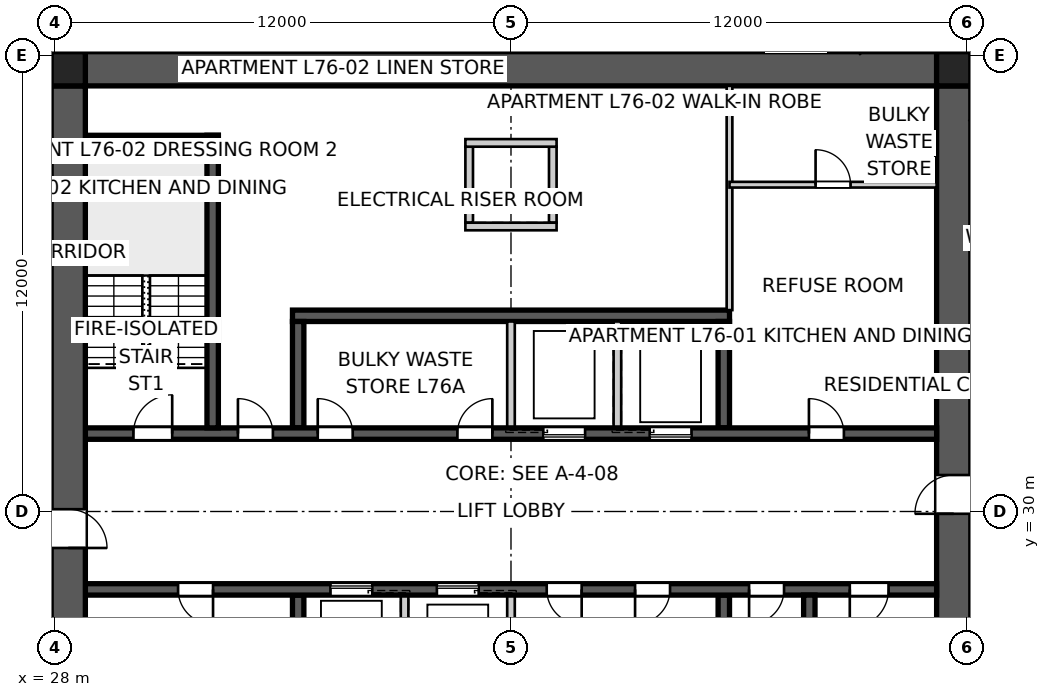
"""IFC4 building model, lengths in metres.
Left out: names, types, materials, properties, quantities, classifications, styles, units other than length and angle.
Written with IfcOpenShell. Run it as: python <this file> out.ifc"""

import sys

from ifc_helpers import new_model, si_unit, direction, frame, frame_2d, origin, origin_2d, place, context, subcontext, project, spatial, polyline, rectangle, outline, extrude, element, fill, save


model = new_model("IFC4")
c1 = context("Model", 3, precision=1e-05, world=origin(), true_north=direction((0.0, 1.0)))
c2 = subcontext(c1, "Body", "Model", "MODEL_VIEW")
j1 = project(units=[si_unit("LENGTHUNIT", "METRE"), si_unit("PLANEANGLEUNIT", "RADIAN")], contexts=[c1])
p1 = place(None, origin())
s1 = spatial("IfcSite", under=j1, at=p1, CompositionType="ELEMENT")
p2 = place(p1, origin())
s2 = spatial("IfcBuilding", under=s1, at=p2, CompositionType="ELEMENT")
p3 = place(p2, frame((0.0, 0.0, 276.0)))
s3 = spatial("IfcBuildingStorey", under=s2, at=p3, CompositionType="ELEMENT", Elevation=276.0)
p4 = place(p3, frame((28.8, 41.65, 0.0), z_axis=(0.0, 0.0, 1.0), x_axis=(1.0, 0.0, 0.0)))
e1 = element("IfcWall", 1, at=p4, inside=s3, PredefinedType="SHEAR", context=c2, shape_type="SweptSolid", body=[
    extrude(outline(polyline([(0.0, -0.45), (22.4, -0.45), (22.4, -0.025), (22.85, -0.025), (22.85, 0.025), (22.4, 0.025), (22.4, 0.45), (0.0, 0.45), (0.0, 0.025), (-0.45, 0.025), (-0.45, -0.025), (0.0, -0.025), (0.0, -0.45)])), origin(), (0.0, 0.0, 1.0), 3.4),
])
p5 = place(p3, frame((51.65, 18.8, 0.0), z_axis=(0.0, 0.0, 1.0), x_axis=(0.0, 1.0, 0.0)))
e2 = element("IfcWall", 2, at=p5, inside=s3, PredefinedType="SHEAR", context=c2, shape_type="SweptSolid", body=[
    extrude(outline(polyline([(0.0, -0.45), (22.4, -0.45), (22.4, -0.025), (22.85, -0.025), (22.85, 0.025), (22.4, 0.025), (22.4, 0.45), (0.0, 0.45), (0.0, 0.025), (-0.45, 0.025), (-0.45, -0.025), (0.0, -0.025), (0.0, -0.45)])), origin(), (0.0, 0.0, 1.0), 3.4),
])
p6 = place(p5, frame((11.14, 0.0, 0.0)))
e3 = element("IfcOpeningElement", 3, at=p6, cuts=e2, PredefinedType="OPENING", context=c2, shape_type="SweptSolid", body=[
    extrude(rectangle(XDim=1.02, YDim=2.4, at=frame_2d((0.51, 1.2))), frame((0.0, 0.46, 0.0), z_axis=(0.0, -1.0, 0.0), x_axis=(1.0, 0.0, 0.0)), (0.0, 0.0, 1.0), 0.92),
])
p7 = place(p3, frame((28.35, 41.2, 0.0), z_axis=(0.0, 0.0, 1.0), x_axis=(0.0, -1.0, 0.0)))
e4 = element("IfcWall", 4, at=p7, inside=s3, PredefinedType="SHEAR", context=c2, shape_type="SweptSolid", body=[
    extrude(outline(polyline([(0.0, -0.45), (22.4, -0.45), (22.4, -0.025), (22.85, -0.025), (22.85, 0.025), (22.4, 0.025), (22.4, 0.45), (0.0, 0.45), (0.0, 0.025), (-0.45, 0.025), (-0.45, -0.025), (0.0, -0.025), (0.0, -0.45)])), origin(), (0.0, 0.0, 1.0), 3.4),
])
p8 = place(p7, frame((11.14, 0.0, 0.0)))
e5 = element("IfcOpeningElement", 5, at=p8, cuts=e4, PredefinedType="OPENING", context=c2, shape_type="SweptSolid", body=[
    extrude(rectangle(XDim=1.02, YDim=2.4, at=frame_2d((0.51, 1.2))), frame((0.0, 0.46, 0.0), z_axis=(0.0, -1.0, 0.0), x_axis=(1.0, 0.0, 0.0)), (0.0, 0.0, 1.0), 0.92),
])
p9 = place(p3, frame((28.8, 32.05, 0.0), z_axis=(0.0, 0.0, 1.0), x_axis=(1.0, 0.0, 0.0)))
e6 = element("IfcWall", 6, at=p9, inside=s3, PredefinedType="SHEAR", context=c2, shape_type="SweptSolid", body=[
    extrude(rectangle(XDim=22.4, YDim=0.3, at=frame_2d((11.2, 0.0))), origin(), (0.0, 0.0, 1.0), 3.4),
])
p10 = place(p9, frame((19.04, 0.0, 0.0)))
e7 = element("IfcOpeningElement", 7, at=p10, cuts=e6, PredefinedType="OPENING", context=c2, shape_type="SweptSolid", body=[
    extrude(rectangle(XDim=0.92, YDim=2.1, at=frame_2d((0.46, 1.05))), frame((0.0, 0.16, 0.0), z_axis=(0.0, -1.0, 0.0), x_axis=(1.0, 0.0, 0.0)), (0.0, 0.0, 1.0), 0.32),
])
p11 = place(p9, frame((1.265, 0.0, 0.0)))
e8 = element("IfcOpeningElement", 8, at=p11, cuts=e6, PredefinedType="OPENING", context=c2, shape_type="SweptSolid", body=[
    extrude(rectangle(XDim=1.02, YDim=2.1, at=frame_2d((0.51, 1.05))), frame((0.0, 0.16, 0.0), z_axis=(0.0, -1.0, 0.0), x_axis=(1.0, 0.0, 0.0)), (0.0, 0.0, 1.0), 0.32),
])
p12 = place(p9, frame((4.015, 0.0, 0.0)))
e9 = element("IfcOpeningElement", 9, at=p12, cuts=e6, PredefinedType="OPENING", context=c2, shape_type="SweptSolid", body=[
    extrude(rectangle(XDim=0.92, YDim=2.1, at=frame_2d((0.46, 1.05))), frame((0.0, 0.16, 0.0), z_axis=(0.0, -1.0, 0.0), x_axis=(1.0, 0.0, 0.0)), (0.0, 0.0, 1.0), 0.32),
])
p13 = place(p9, frame((6.115, 0.0, 0.0)))
e10 = element("IfcOpeningElement", 10, at=p13, cuts=e6, PredefinedType="OPENING", context=c2, shape_type="SweptSolid", body=[
    extrude(rectangle(XDim=0.92, YDim=2.1, at=frame_2d((0.46, 1.05))), frame((0.0, 0.16, 0.0), z_axis=(0.0, -1.0, 0.0), x_axis=(1.0, 0.0, 0.0)), (0.0, 0.0, 1.0), 0.32),
])
p14 = place(p9, frame((9.79, 0.0, 0.0)))
e11 = element("IfcOpeningElement", 11, at=p14, cuts=e6, PredefinedType="OPENING", context=c2, shape_type="SweptSolid", body=[
    extrude(rectangle(XDim=0.92, YDim=2.1, at=frame_2d((0.46, 1.05))), frame((0.0, 0.16, 0.0), z_axis=(0.0, -1.0, 0.0), x_axis=(1.0, 0.0, 0.0)), (0.0, 0.0, 1.0), 0.32),
])
p15 = place(p9, frame((12.05, 0.0, 0.0)))
e12 = element("IfcOpeningElement", 12, at=p15, cuts=e6, PredefinedType="OPENING", context=c2, shape_type="SweptSolid", body=[
    extrude(rectangle(XDim=1.1, YDim=2.1, at=frame_2d((0.55, 1.05))), frame((0.0, 0.16, 0.0), z_axis=(0.0, -1.0, 0.0), x_axis=(1.0, 0.0, 0.0)), (0.0, 0.0, 1.0), 0.32),
])
p16 = place(p9, frame((14.85, 0.0, 0.0)))
e13 = element("IfcOpeningElement", 13, at=p16, cuts=e6, PredefinedType="OPENING", context=c2, shape_type="SweptSolid", body=[
    extrude(rectangle(XDim=1.1, YDim=2.1, at=frame_2d((0.55, 1.05))), frame((0.0, 0.16, 0.0), z_axis=(0.0, -1.0, 0.0), x_axis=(1.0, 0.0, 0.0)), (0.0, 0.0, 1.0), 0.32),
])
p17 = place(p3, frame((51.2, 27.95, 0.0), z_axis=(0.0, 0.0, 1.0), x_axis=(-1.0, 0.0, 0.0)))
e14 = element("IfcWall", 14, at=p17, inside=s3, PredefinedType="SHEAR", context=c2, shape_type="SweptSolid", body=[
    extrude(rectangle(XDim=22.4, YDim=0.3, at=frame_2d((11.2, 0.0))), origin(), (0.0, 0.0, 1.0), 3.4),
])
p18 = place(p17, frame((19.04, 0.0, 0.0)))
e15 = element("IfcOpeningElement", 15, at=p18, cuts=e14, PredefinedType="OPENING", context=c2, shape_type="SweptSolid", body=[
    extrude(rectangle(XDim=0.92, YDim=2.1, at=frame_2d((0.46, 1.05))), frame((0.0, 0.16, 0.0), z_axis=(0.0, -1.0, 0.0), x_axis=(1.0, 0.0, 0.0)), (0.0, 0.0, 1.0), 0.32),
])
p19 = place(p17, frame((1.265, 0.0, 0.0)))
e16 = element("IfcOpeningElement", 16, at=p19, cuts=e14, PredefinedType="OPENING", context=c2, shape_type="SweptSolid", body=[
    extrude(rectangle(XDim=1.02, YDim=2.1, at=frame_2d((0.51, 1.05))), frame((0.0, 0.16, 0.0), z_axis=(0.0, -1.0, 0.0), x_axis=(1.0, 0.0, 0.0)), (0.0, 0.0, 1.0), 0.32),
])
p20 = place(p17, frame((4.015, 0.0, 0.0)))
e17 = element("IfcOpeningElement", 17, at=p20, cuts=e14, PredefinedType="OPENING", context=c2, shape_type="SweptSolid", body=[
    extrude(rectangle(XDim=0.92, YDim=2.1, at=frame_2d((0.46, 1.05))), frame((0.0, 0.16, 0.0), z_axis=(0.0, -1.0, 0.0), x_axis=(1.0, 0.0, 0.0)), (0.0, 0.0, 1.0), 0.32),
])
p21 = place(p17, frame((9.34, 0.0, 0.0)))
e18 = element("IfcOpeningElement", 18, at=p21, cuts=e14, PredefinedType="OPENING", context=c2, shape_type="SweptSolid", body=[
    extrude(rectangle(XDim=0.92, YDim=2.1, at=frame_2d((0.46, 1.05))), frame((0.0, 0.16, 0.0), z_axis=(0.0, -1.0, 0.0), x_axis=(1.0, 0.0, 0.0)), (0.0, 0.0, 1.0), 0.32),
])
p22 = place(p17, frame((7.015, 0.0, 0.0)))
e19 = element("IfcOpeningElement", 19, at=p22, cuts=e14, PredefinedType="OPENING", context=c2, shape_type="SweptSolid", body=[
    extrude(rectangle(XDim=0.92, YDim=2.1, at=frame_2d((0.46, 1.05))), frame((0.0, 0.16, 0.0), z_axis=(0.0, -1.0, 0.0), x_axis=(1.0, 0.0, 0.0)), (0.0, 0.0, 1.0), 0.32),
])
p23 = place(p17, frame((12.05, 0.0, 0.0)))
e20 = element("IfcOpeningElement", 20, at=p23, cuts=e14, PredefinedType="OPENING", context=c2, shape_type="SweptSolid", body=[
    extrude(rectangle(XDim=1.1, YDim=2.1, at=frame_2d((0.55, 1.05))), frame((0.0, 0.16, 0.0), z_axis=(0.0, -1.0, 0.0), x_axis=(1.0, 0.0, 0.0)), (0.0, 0.0, 1.0), 0.32),
])
p24 = place(p17, frame((14.85, 0.0, 0.0)))
e21 = element("IfcOpeningElement", 21, at=p24, cuts=e14, PredefinedType="OPENING", context=c2, shape_type="SweptSolid", body=[
    extrude(rectangle(XDim=1.1, YDim=2.1, at=frame_2d((0.55, 1.05))), frame((0.0, 0.16, 0.0), z_axis=(0.0, -1.0, 0.0), x_axis=(1.0, 0.0, 0.0)), (0.0, 0.0, 1.0), 0.32),
])
p25 = place(p3, frame((34.25, 35.15, 0.0), z_axis=(0.0, 0.0, 1.0), x_axis=(1.0, 0.0, 0.0)))
e22 = element("IfcWall", 22, at=p25, inside=s3, PredefinedType="SHEAR", context=c2, shape_type="SweptSolid", body=[
    extrude(rectangle(XDim=11.5, YDim=0.3, at=frame_2d((5.75, 0.0))), origin(), (0.0, 0.0, 1.0), 3.4),
])
for number, where, z_axis, x_axis in (
    (23, (34.4, 32.2, 0.0), (0.0, 0.0, 1.0), (0.0, 1.0, 0.0)),
    (24, (45.6, 27.8, 0.0), (0.0, 0.0, 1.0), (0.0, -1.0, 0.0)),
):
    element("IfcWall", number, at=place(p3, frame(where, z_axis=z_axis, x_axis=x_axis)), inside=s3, PredefinedType="SHEAR", context=c2, shape_type="SweptSolid", body=[
        extrude(rectangle(XDim=2.8, YDim=0.3, at=frame_2d((1.4, 0.0))), origin(), (0.0, 0.0, 1.0), 3.4),
    ])
for number, where, z_axis, x_axis in (
    (25, (40.0, 32.2, 0.0), (0.0, 0.0, 1.0), (0.0, 1.0, 0.0)),
    (26, (40.0, 27.8, 0.0), (0.0, 0.0, 1.0), (0.0, -1.0, 0.0)),
    (27, (42.8, 32.2, 0.0), (0.0, 0.0, 1.0), (0.0, 1.0, 0.0)),
    (28, (37.2, 27.8, 0.0), (0.0, 0.0, 1.0), (0.0, -1.0, 0.0)),
):
    element("IfcWall", number, at=place(p3, frame(where, z_axis=z_axis, x_axis=x_axis)), inside=s3, PredefinedType="SOLIDWALL", context=c2, shape_type="SweptSolid", body=[
        extrude(rectangle(XDim=2.8, YDim=0.2, at=frame_2d((1.4, 0.0))), origin(), (0.0, 0.0, 1.0), 3.4),
    ])
for number, where, z_axis, x_axis in (
    (29, (45.6, 32.2, 0.0), (0.0, 0.0, 1.0), (0.0, 1.0, 0.0)),
    (30, (34.4, 27.8, 0.0), (0.0, 0.0, 1.0), (0.0, -1.0, 0.0)),
):
    element("IfcWall", number, at=place(p3, frame(where, z_axis=z_axis, x_axis=x_axis)), inside=s3, PredefinedType="SHEAR", context=c2, shape_type="SweptSolid", body=[
        extrude(rectangle(XDim=2.8, YDim=0.3, at=frame_2d((1.4, 0.0))), origin(), (0.0, 0.0, 1.0), 3.4),
    ])
p26 = place(p3, frame((32.15, 32.2, 0.0), z_axis=(0.0, 0.0, 1.0), x_axis=(0.0, 1.0, 0.0)))
e31 = element("IfcWall", 31, at=p26, inside=s3, PredefinedType="SHEAR", context=c2, shape_type="SweptSolid", body=[
    extrude(rectangle(XDim=7.7, YDim=0.3, at=frame_2d((3.85, 0.0))), origin(), (0.0, 0.0, 1.0), 3.4),
])
p27 = place(p3, frame((28.8, 39.75, 0.0), z_axis=(0.0, 0.0, 1.0), x_axis=(1.0, 0.0, 0.0)))
e32 = element("IfcWall", 32, at=p27, inside=s3, PredefinedType="SHEAR", context=c2, shape_type="SweptSolid", body=[
    extrude(rectangle(XDim=3.5, YDim=0.3, at=frame_2d((1.75, 0.0))), origin(), (0.0, 0.0, 1.0), 3.4),
])
p28 = place(p3, frame((47.85, 27.8, 0.0), z_axis=(0.0, 0.0, 1.0), x_axis=(0.0, -1.0, 0.0)))
e33 = element("IfcWall", 33, at=p28, inside=s3, PredefinedType="SHEAR", context=c2, shape_type="SweptSolid", body=[
    extrude(rectangle(XDim=7.7, YDim=0.3, at=frame_2d((3.85, 0.0))), origin(), (0.0, 0.0, 1.0), 3.4),
])
for number, where, z_axis, x_axis in (
    (34, (38.9, 37.6, 0.0), (0.0, 0.0, 1.0), (0.0, 1.0, 0.0)),
    (35, (41.1, 37.6, 0.0), (0.0, 0.0, 1.0), (0.0, 1.0, 0.0)),
):
    element("IfcWall", number, at=place(p3, frame(where, z_axis=z_axis, x_axis=x_axis)), inside=s3, PredefinedType="SOLIDWALL", context=c2, shape_type="SweptSolid", body=[
        extrude(rectangle(XDim=2.0, YDim=0.2, at=frame_2d((1.0, 0.0))), origin(), (0.0, 0.0, 1.0), 3.4),
    ])
for number, where, z_axis, x_axis in (
    (36, (38.8, 37.5, 0.0), (0.0, 0.0, 1.0), (1.0, 0.0, 0.0)),
    (37, (38.8, 39.7, 0.0), (0.0, 0.0, 1.0), (1.0, 0.0, 0.0)),
):
    element("IfcWall", number, at=place(p3, frame(where, z_axis=z_axis, x_axis=x_axis)), inside=s3, PredefinedType="SOLIDWALL", context=c2, shape_type="SweptSolid", body=[
        extrude(rectangle(XDim=2.4, YDim=0.2, at=frame_2d((1.2, 0.0))), origin(), (0.0, 0.0, 1.0), 3.4),
    ])
for number, where, z_axis, x_axis in (
    (38, (51.65, 41.65, 0.0), (0.0, 0.0, 1.0), (1.0, 0.0, 0.0)),
    (39, (28.35, 41.65, 0.0), (0.0, 0.0, 1.0), (1.0, 0.0, 0.0)),
):
    element("IfcColumn", number, at=place(p3, frame(where, z_axis=z_axis, x_axis=x_axis)), inside=s3, PredefinedType="COLUMN", context=c2, shape_type="SweptSolid", body=[
        extrude(rectangle(XDim=0.9, YDim=0.9, at=origin_2d()), origin(), (0.0, 0.0, 1.0), 3.4),
    ])
p29 = place(p3, frame((55.704, 43.177, 0.0), z_axis=(0.0, 0.0, 1.0), x_axis=(-0.76603440109, -0.64279957712, 0.0)))
e40 = element("IfcWall", 40, at=p29, inside=s3, PredefinedType="PARTITIONING", context=c2, shape_type="SweptSolid", body=[
    extrude(rectangle(XDim=4.64, YDim=0.25, at=frame_2d((2.32, 0.0))), origin(), (0.0, 0.0, 1.0), 3.25),
])
p30 = place(p3, frame((45.75, 41.2, 0.0), z_axis=(0.0, 0.0, 1.0), x_axis=(0.0, -1.0, 0.0)))
e41 = element("IfcWall", 41, at=p30, inside=s3, PredefinedType="SOLIDWALL", context=c2, shape_type="SweptSolid", body=[
    extrude(rectangle(XDim=5.9, YDim=0.15, at=frame_2d((2.95, 0.0))), origin(), (0.0, 0.0, 1.0), 3.25),
])
p31 = place(p3, frame((45.75, 38.6, 0.0), z_axis=(0.0, 0.0, 1.0), x_axis=(1.0, 0.0, 0.0)))
e42 = element("IfcWall", 42, at=p31, inside=s3, PredefinedType="SOLIDWALL", context=c2, shape_type="SweptSolid", body=[
    extrude(rectangle(XDim=5.45, YDim=0.15, at=frame_2d((2.725, 0.0))), origin(), (0.0, 0.0, 1.0), 3.25),
])
p32 = place(p31, frame((2.265, 0.0, 0.0)))
e43 = element("IfcOpeningElement", 43, at=p32, cuts=e42, PredefinedType="OPENING", context=c2, shape_type="SweptSolid", body=[
    extrude(rectangle(XDim=0.92, YDim=2.1, at=frame_2d((0.46, 1.05))), frame((0.0, 0.085, 0.0), z_axis=(0.0, -1.0, 0.0), x_axis=(1.0, 0.0, 0.0)), (0.0, 0.0, 1.0), 0.17),
])
p33 = place(p3, frame((28.663, 41.18, 0.0), z_axis=(0.0, 0.0, 1.0), x_axis=(0.0, 1.0, 0.0)))
e44 = element("IfcWall", 44, at=p33, inside=s3, PredefinedType="PARTITIONING", context=c2, shape_type="SweptSolid", body=[
    extrude(rectangle(XDim=5.82, YDim=0.12, at=frame_2d((2.91, 0.0))), origin(), (0.0, 0.0, 1.0), 3.25),
])
p34 = place(p33, frame((2.44, 0.0, 0.0)))
e45 = element("IfcOpeningElement", 45, at=p34, cuts=e44, PredefinedType="OPENING", context=c2, shape_type="SweptSolid", body=[
    extrude(rectangle(XDim=0.96, YDim=2.1, at=frame_2d((0.48, 1.05))), frame((0.0, 0.07, 0.0), z_axis=(0.0, -1.0, 0.0), x_axis=(1.0, 0.0, 0.0)), (0.0, 0.0, 1.0), 0.14),
])
p35 = place(p3, frame((49.136, 42.1, 0.0), z_axis=(0.0, 0.0, 1.0), x_axis=(0.766055078255, 0.642774935012, 0.0)))
e46 = element("IfcWall", 46, at=p35, inside=s3, PredefinedType="SOLIDWALL", context=c2, shape_type="SweptSolid", body=[
    extrude(rectangle(XDim=5.684, YDim=0.15, at=frame_2d((2.842, 0.0))), origin(), (0.0, 0.0, 1.0), 3.25),
])
p36 = place(p35, frame((2.402, 0.0, 0.0)))
e47 = element("IfcOpeningElement", 47, at=p36, cuts=e46, PredefinedType="OPENING", context=c2, shape_type="SweptSolid", body=[
    extrude(rectangle(XDim=0.92, YDim=2.1, at=frame_2d((0.46, 1.05))), frame((0.0, 0.085, 0.0), z_axis=(0.0, -1.0, 0.0), x_axis=(1.0, 0.0, 0.0)), (0.0, 0.0, 1.0), 0.17),
])
p37 = place(p10, origin())
e48 = element("IfcDoor", 48, at=p37, inside=s3, OperationType="SINGLE_SWING_LEFT", PredefinedType="DOOR", context=c2, shape_type="SweptSolid", body=[
    extrude(rectangle(XDim=0.92, YDim=2.1, at=frame_2d((0.46, 1.05))), frame((0.0, 0.025, 0.0), z_axis=(0.0, -1.0, 0.0), x_axis=(1.0, 0.0, 0.0)), (0.0, 0.0, 1.0), 0.05),
])
fill(e7, e48)
p38 = place(p18, origin())
e49 = element("IfcDoor", 49, at=p38, inside=s3, OperationType="SINGLE_SWING_LEFT", PredefinedType="DOOR", context=c2, shape_type="SweptSolid", body=[
    extrude(rectangle(XDim=0.92, YDim=2.1, at=frame_2d((0.46, 1.05))), frame((0.0, 0.025, 0.0), z_axis=(0.0, -1.0, 0.0), x_axis=(1.0, 0.0, 0.0)), (0.0, 0.0, 1.0), 0.05),
])
fill(e15, e49)
p39 = place(p19, origin())
e50 = element("IfcDoor", 50, at=p39, inside=s3, OperationType="SINGLE_SWING_RIGHT", PredefinedType="DOOR", context=c2, shape_type="SweptSolid", body=[
    extrude(rectangle(XDim=1.02, YDim=2.1, at=frame_2d((0.51, 1.05))), frame((0.0, 0.025, 0.0), z_axis=(0.0, -1.0, 0.0), x_axis=(1.0, 0.0, 0.0)), (0.0, 0.0, 1.0), 0.05),
])
fill(e16, e50)
p40 = place(p11, origin())
e51 = element("IfcDoor", 51, at=p40, inside=s3, OperationType="SINGLE_SWING_RIGHT", PredefinedType="DOOR", context=c2, shape_type="SweptSolid", body=[
    extrude(rectangle(XDim=1.02, YDim=2.1, at=frame_2d((0.51, 1.05))), frame((0.0, 0.025, 0.0), z_axis=(0.0, -1.0, 0.0), x_axis=(1.0, 0.0, 0.0)), (0.0, 0.0, 1.0), 0.05),
])
fill(e8, e51)
p41 = place(p12, origin())
e52 = element("IfcDoor", 52, at=p41, inside=s3, OperationType="SINGLE_SWING_LEFT", PredefinedType="DOOR", context=c2, shape_type="SweptSolid", body=[
    extrude(rectangle(XDim=0.92, YDim=2.1, at=frame_2d((0.46, 1.05))), frame((0.0, 0.025, 0.0), z_axis=(0.0, -1.0, 0.0), x_axis=(1.0, 0.0, 0.0)), (0.0, 0.0, 1.0), 0.05),
])
fill(e9, e52)
p42 = place(p20, origin())
e53 = element("IfcDoor", 53, at=p42, inside=s3, OperationType="SINGLE_SWING_RIGHT", PredefinedType="DOOR", context=c2, shape_type="SweptSolid", body=[
    extrude(rectangle(XDim=0.92, YDim=2.1, at=frame_2d((0.46, 1.05))), frame((0.0, 0.025, 0.0), z_axis=(0.0, -1.0, 0.0), x_axis=(1.0, 0.0, 0.0)), (0.0, 0.0, 1.0), 0.05),
])
fill(e17, e53)
p43 = place(p32, origin())
e54 = element("IfcDoor", 54, at=p43, inside=s3, OperationType="SINGLE_SWING_LEFT", PredefinedType="DOOR", context=c2, shape_type="SweptSolid", body=[
    extrude(rectangle(XDim=0.92, YDim=2.1, at=frame_2d((0.46, 1.05))), frame((0.0, 0.025, 0.0), z_axis=(0.0, -1.0, 0.0), x_axis=(1.0, 0.0, 0.0)), (0.0, 0.0, 1.0), 0.05),
])
fill(e43, e54)
p44 = place(p13, origin())
e55 = element("IfcDoor", 55, at=p44, inside=s3, OperationType="SINGLE_SWING_LEFT", PredefinedType="DOOR", context=c2, shape_type="SweptSolid", body=[
    extrude(rectangle(XDim=0.92, YDim=2.1, at=frame_2d((0.46, 1.05))), frame((0.0, 0.025, 0.0), z_axis=(0.0, -1.0, 0.0), x_axis=(1.0, 0.0, 0.0)), (0.0, 0.0, 1.0), 0.05),
])
fill(e10, e55)
p45 = place(p14, origin())
e56 = element("IfcDoor", 56, at=p45, inside=s3, OperationType="SINGLE_SWING_RIGHT", PredefinedType="DOOR", context=c2, shape_type="SweptSolid", body=[
    extrude(rectangle(XDim=0.92, YDim=2.1, at=frame_2d((0.46, 1.05))), frame((0.0, 0.025, 0.0), z_axis=(0.0, -1.0, 0.0), x_axis=(1.0, 0.0, 0.0)), (0.0, 0.0, 1.0), 0.05),
])
fill(e11, e56)
p46 = place(p21, origin())
e57 = element("IfcDoor", 57, at=p46, inside=s3, OperationType="SINGLE_SWING_LEFT", PredefinedType="DOOR", context=c2, shape_type="SweptSolid", body=[
    extrude(rectangle(XDim=0.92, YDim=2.1, at=frame_2d((0.46, 1.05))), frame((0.0, 0.025, 0.0), z_axis=(0.0, -1.0, 0.0), x_axis=(1.0, 0.0, 0.0)), (0.0, 0.0, 1.0), 0.05),
])
fill(e18, e57)
p47 = place(p22, origin())
e58 = element("IfcDoor", 58, at=p47, inside=s3, OperationType="SINGLE_SWING_RIGHT", PredefinedType="DOOR", context=c2, shape_type="SweptSolid", body=[
    extrude(rectangle(XDim=0.92, YDim=2.1, at=frame_2d((0.46, 1.05))), frame((0.0, 0.025, 0.0), z_axis=(0.0, -1.0, 0.0), x_axis=(1.0, 0.0, 0.0)), (0.0, 0.0, 1.0), 0.05),
])
fill(e19, e58)
p48 = place(p6, origin())
e59 = element("IfcDoor", 59, at=p48, inside=s3, OperationType="SINGLE_SWING_LEFT", PredefinedType="DOOR", context=c2, shape_type="SweptSolid", body=[
    extrude(rectangle(XDim=1.02, YDim=2.4, at=frame_2d((0.51, 1.2))), frame((0.0, 0.025, 0.0), z_axis=(0.0, -1.0, 0.0), x_axis=(1.0, 0.0, 0.0)), (0.0, 0.0, 1.0), 0.05),
])
fill(e3, e59)
p49 = place(p8, origin())
e60 = element("IfcDoor", 60, at=p49, inside=s3, OperationType="SINGLE_SWING_RIGHT", PredefinedType="DOOR", context=c2, shape_type="SweptSolid", body=[
    extrude(rectangle(XDim=1.02, YDim=2.4, at=frame_2d((0.51, 1.2))), frame((0.0, 0.025, 0.0), z_axis=(0.0, -1.0, 0.0), x_axis=(1.0, 0.0, 0.0)), (0.0, 0.0, 1.0), 0.05),
])
fill(e5, e60)
p50 = place(p15, origin())
e61 = element("IfcDoor", 61, at=p50, inside=s3, OperationType="SLIDING_TO_LEFT", PredefinedType="DOOR", context=c2, shape_type="SweptSolid", body=[
    extrude(rectangle(XDim=1.1, YDim=2.1, at=frame_2d((0.55, 1.05))), frame((0.0, 0.025, 0.0), z_axis=(0.0, -1.0, 0.0), x_axis=(1.0, 0.0, 0.0)), (0.0, 0.0, 1.0), 0.05),
])
fill(e12, e61)
p51 = place(p23, origin())
e62 = element("IfcDoor", 62, at=p51, inside=s3, OperationType="SLIDING_TO_LEFT", PredefinedType="DOOR", context=c2, shape_type="SweptSolid", body=[
    extrude(rectangle(XDim=1.1, YDim=2.1, at=frame_2d((0.55, 1.05))), frame((0.0, 0.025, 0.0), z_axis=(0.0, -1.0, 0.0), x_axis=(1.0, 0.0, 0.0)), (0.0, 0.0, 1.0), 0.05),
])
fill(e20, e62)
p52 = place(p16, origin())
e63 = element("IfcDoor", 63, at=p52, inside=s3, OperationType="SLIDING_TO_LEFT", PredefinedType="DOOR", context=c2, shape_type="SweptSolid", body=[
    extrude(rectangle(XDim=1.1, YDim=2.1, at=frame_2d((0.55, 1.05))), frame((0.0, 0.025, 0.0), z_axis=(0.0, -1.0, 0.0), x_axis=(1.0, 0.0, 0.0)), (0.0, 0.0, 1.0), 0.05),
])
fill(e13, e63)
p53 = place(p24, origin())
e64 = element("IfcDoor", 64, at=p53, inside=s3, OperationType="SLIDING_TO_LEFT", PredefinedType="DOOR", context=c2, shape_type="SweptSolid", body=[
    extrude(rectangle(XDim=1.1, YDim=2.1, at=frame_2d((0.55, 1.05))), frame((0.0, 0.025, 0.0), z_axis=(0.0, -1.0, 0.0), x_axis=(1.0, 0.0, 0.0)), (0.0, 0.0, 1.0), 0.05),
])
fill(e21, e64)
save(model, sys.argv[1])
